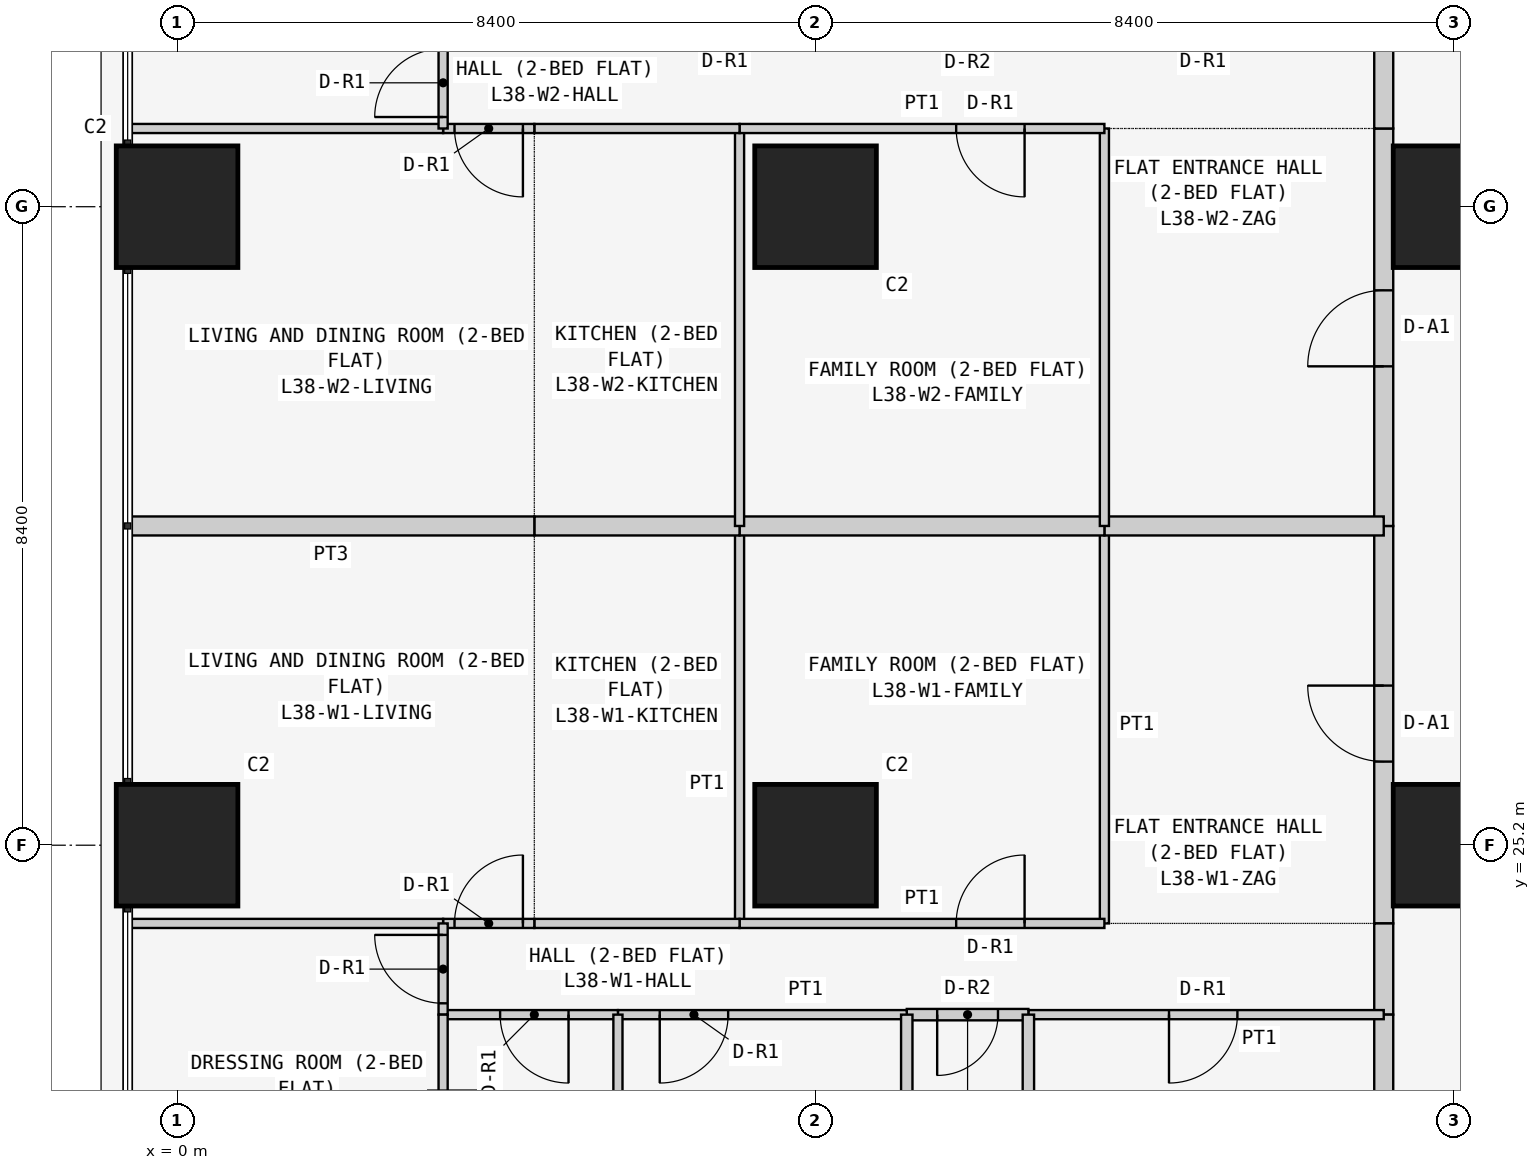
"""IFC4 building model, lengths in metres.
Left out: names, types, materials, properties, quantities, classifications, styles, units other than length and angle.
Written with IfcOpenShell. Run it as: python <this file> out.ifc"""

import sys

from ifc_helpers import new_model, si_unit, direction, frame, frame_2d, origin, origin_2d, place, context, subcontext, project, spatial, rectangle, extrude, element, fill, save


model = new_model("IFC4")
c1 = context("Model", 3, precision=1e-05, world=origin(), true_north=direction((0.0, 1.0)))
c2 = subcontext(c1, "Body", "Model", "MODEL_VIEW")
j1 = project(units=[si_unit("LENGTHUNIT", "METRE"), si_unit("PLANEANGLEUNIT", "RADIAN")], contexts=[c1])
p1 = place(None, origin())
s1 = spatial("IfcSite", under=j1, at=p1, CompositionType="ELEMENT")
p2 = place(p1, origin())
s2 = spatial("IfcBuilding", under=s1, at=p2, CompositionType="ELEMENT")
p3 = place(p2, frame((0.0, 0.0, 148.5)))
s3 = spatial("IfcBuildingStorey", under=s2, at=p3, CompositionType="ELEMENT", Elevation=148.5)
for number, where, z_axis, x_axis in (
    (1, (0.0, 25.2, 0.0), (0.0, 0.0, 1.0), (1.0, 0.0, 0.0)),
    (2, (0.0, 33.6, 0.0), (0.0, 0.0, 1.0), (1.0, 0.0, 0.0)),
    (3, (8.4, 25.2, 0.0), (0.0, 0.0, 1.0), (1.0, 0.0, 0.0)),
    (4, (8.4, 33.6, 0.0), (0.0, 0.0, 1.0), (1.0, 0.0, 0.0)),
    (5, (16.8, 25.2, 0.0), (0.0, 0.0, 1.0), (1.0, 0.0, 0.0)),
    (6, (16.8, 33.6, 0.0), (0.0, 0.0, 1.0), (1.0, 0.0, 0.0)),
):
    element("IfcColumn", number, at=place(p3, frame(where, z_axis=z_axis, x_axis=x_axis)), inside=s3, PredefinedType="COLUMN", context=c2, shape_type="SweptSolid", body=[
        extrude(rectangle(XDim=1.6, YDim=1.6, at=origin_2d()), origin(), (0.0, 0.0, 1.0), 3.6),
    ])
p4 = place(p3, frame((15.875, 24.171, 0.0), z_axis=(0.0, 0.0, 1.0), x_axis=(0.0, 1.0, 0.0)))
e7 = element("IfcWall", 7, at=p4, inside=s3, PredefinedType="PARTITIONING", context=c2, shape_type="SweptSolid", body=[
    extrude(rectangle(XDim=5.229, YDim=0.25, at=frame_2d((2.615, 0.0))), origin(), (0.0, 0.0, 1.0), 3.45),
])
p5 = place(p4, frame((2.129, 0.0, 0.0)))
e8 = element("IfcOpeningElement", 8, at=p5, cuts=e7, PredefinedType="OPENING", context=c2, shape_type="SweptSolid", body=[
    extrude(rectangle(XDim=1.0, YDim=2.1, at=frame_2d((0.5, 1.05))), frame((0.0, 0.135, 0.0), z_axis=(0.0, -1.0, 0.0), x_axis=(1.0, 0.0, 0.0)), (0.0, 0.0, 1.0), 0.27),
])
p6 = place(p3, frame((15.875, 22.971, 0.0), z_axis=(0.0, 0.0, 1.0), x_axis=(0.0, 1.0, 0.0)))
e9 = element("IfcWall", 9, at=p6, inside=s3, PredefinedType="PARTITIONING", context=c2, shape_type="SweptSolid", body=[
    extrude(rectangle(XDim=1.2, YDim=0.25, at=frame_2d((0.6, 0.0))), origin(), (0.0, 0.0, 1.0), 3.45),
])
p7 = place(p3, frame((15.875, 16.1, 0.0), z_axis=(0.0, 0.0, 1.0), x_axis=(0.0, 1.0, 0.0)))
e10 = element("IfcWall", 10, at=p7, inside=s3, PredefinedType="PARTITIONING", context=c2, shape_type="SweptSolid", body=[
    extrude(rectangle(XDim=6.871, YDim=0.25, at=frame_2d((3.436, 0.0))), origin(), (0.0, 0.0, 1.0), 3.45),
])
p8 = place(p3, frame((15.875, 29.4, 0.0), z_axis=(0.0, 0.0, 1.0), x_axis=(0.0, 1.0, 0.0)))
e11 = element("IfcWall", 11, at=p8, inside=s3, PredefinedType="PARTITIONING", context=c2, shape_type="SweptSolid", body=[
    extrude(rectangle(XDim=5.229, YDim=0.25, at=frame_2d((2.615, 0.0))), origin(), (0.0, 0.0, 1.0), 3.45),
])
p9 = place(p8, frame((2.1, 0.0, 0.0)))
e12 = element("IfcOpeningElement", 12, at=p9, cuts=e11, PredefinedType="OPENING", context=c2, shape_type="SweptSolid", body=[
    extrude(rectangle(XDim=1.0, YDim=2.1, at=frame_2d((0.5, 1.05))), frame((0.0, 0.135, 0.0), z_axis=(0.0, -1.0, 0.0), x_axis=(1.0, 0.0, 0.0)), (0.0, 0.0, 1.0), 0.27),
])
p10 = place(p3, frame((15.875, 34.629, 0.0), z_axis=(0.0, 0.0, 1.0), x_axis=(0.0, 1.0, 0.0)))
e13 = element("IfcWall", 13, at=p10, inside=s3, PredefinedType="PARTITIONING", context=c2, shape_type="SweptSolid", body=[
    extrude(rectangle(XDim=1.2, YDim=0.25, at=frame_2d((0.6, 0.0))), origin(), (0.0, 0.0, 1.0), 3.45),
])
p11 = place(p3, frame((12.2, 29.4, 0.0), z_axis=(0.0, 0.0, 1.0), x_axis=(0.0, -1.0, 0.0)))
e14 = element("IfcWall", 14, at=p11, inside=s3, PredefinedType="PARTITIONING", context=c2, shape_type="SweptSolid", body=[
    extrude(rectangle(XDim=5.229, YDim=0.12, at=frame_2d((2.615, 0.0))), origin(), (0.0, 0.0, 1.0), 3.45),
])
p12 = place(p3, frame((15.875, 29.4, 0.0), z_axis=(0.0, 0.0, 1.0), x_axis=(-1.0, 0.0, 0.0)))
e15 = element("IfcWall", 15, at=p12, inside=s3, PredefinedType="PARTITIONING", context=c2, shape_type="SweptSolid", body=[
    extrude(rectangle(XDim=3.675, YDim=0.25, at=frame_2d((1.837, 0.0))), origin(), (0.0, 0.0, 1.0), 3.45),
])
p13 = place(p3, frame((7.4, 29.4, 0.0), z_axis=(0.0, 0.0, 1.0), x_axis=(0.0, -1.0, 0.0)))
e16 = element("IfcWall", 16, at=p13, inside=s3, PredefinedType="PARTITIONING", context=c2, shape_type="SweptSolid", body=[
    extrude(rectangle(XDim=5.229, YDim=0.12, at=frame_2d((2.615, 0.0))), origin(), (0.0, 0.0, 1.0), 3.45),
])
p14 = place(p3, frame((7.4, 24.171, 0.0), z_axis=(0.0, 0.0, 1.0), x_axis=(1.0, 0.0, 0.0)))
e17 = element("IfcWall", 17, at=p14, inside=s3, PredefinedType="PARTITIONING", context=c2, shape_type="SweptSolid", body=[
    extrude(rectangle(XDim=4.8, YDim=0.12, at=frame_2d((2.4, 0.0))), origin(), (0.0, 0.0, 1.0), 3.45),
])
p15 = place(p14, frame((2.85, 0.0, 0.0)))
e18 = element("IfcOpeningElement", 18, at=p15, cuts=e17, PredefinedType="OPENING", context=c2, shape_type="SweptSolid", body=[
    extrude(rectangle(XDim=0.9, YDim=2.1, at=frame_2d((0.45, 1.05))), frame((0.0, 0.07, 0.0), z_axis=(0.0, -1.0, 0.0), x_axis=(1.0, 0.0, 0.0)), (0.0, 0.0, 1.0), 0.14),
])
p16 = place(p3, frame((12.2, 29.4, 0.0), z_axis=(0.0, 0.0, 1.0), x_axis=(-1.0, 0.0, 0.0)))
e19 = element("IfcWall", 19, at=p16, inside=s3, PredefinedType="PARTITIONING", context=c2, shape_type="SweptSolid", body=[
    extrude(rectangle(XDim=4.8, YDim=0.25, at=frame_2d((2.4, 0.0))), origin(), (0.0, 0.0, 1.0), 3.45),
])
p17 = place(p3, frame((4.7, 24.171, 0.0), z_axis=(0.0, 0.0, 1.0), x_axis=(1.0, 0.0, 0.0)))
e20 = element("IfcWall", 20, at=p17, inside=s3, PredefinedType="PARTITIONING", context=c2, shape_type="SweptSolid", body=[
    extrude(rectangle(XDim=2.7, YDim=0.12, at=frame_2d((1.35, 0.0))), origin(), (0.0, 0.0, 1.0), 3.45),
])
p18 = place(p3, frame((7.4, 29.4, 0.0), z_axis=(0.0, 0.0, 1.0), x_axis=(-1.0, 0.0, 0.0)))
e21 = element("IfcWall", 21, at=p18, inside=s3, PredefinedType="PARTITIONING", context=c2, shape_type="SweptSolid", body=[
    extrude(rectangle(XDim=2.7, YDim=0.25, at=frame_2d((1.35, 0.0))), origin(), (0.0, 0.0, 1.0), 3.45),
])
p19 = place(p3, frame((3.5, 24.171, 0.0), z_axis=(0.0, 0.0, 1.0), x_axis=(1.0, 0.0, 0.0)))
e22 = element("IfcWall", 22, at=p19, inside=s3, PredefinedType="PARTITIONING", context=c2, shape_type="SweptSolid", body=[
    extrude(rectangle(XDim=1.2, YDim=0.12, at=frame_2d((0.6, 0.0))), origin(), (0.0, 0.0, 1.0), 3.45),
])
p20 = place(p19, frame((0.15, 0.0, 0.0)))
e23 = element("IfcOpeningElement", 23, at=p20, cuts=e22, PredefinedType="OPENING", context=c2, shape_type="SweptSolid", body=[
    extrude(rectangle(XDim=0.9, YDim=2.1, at=frame_2d((0.45, 1.05))), frame((0.0, 0.07, 0.0), z_axis=(0.0, -1.0, 0.0), x_axis=(1.0, 0.0, 0.0)), (0.0, 0.0, 1.0), 0.14),
])
p21 = place(p3, frame((-0.65, 24.171, 0.0), z_axis=(0.0, 0.0, 1.0), x_axis=(1.0, 0.0, 0.0)))
e24 = element("IfcWall", 24, at=p21, inside=s3, PredefinedType="PARTITIONING", context=c2, shape_type="SweptSolid", body=[
    extrude(rectangle(XDim=4.15, YDim=0.12, at=frame_2d((2.075, 0.0))), origin(), (0.0, 0.0, 1.0), 3.45),
])
p22 = place(p3, frame((4.7, 29.4, 0.0), z_axis=(0.0, 0.0, 1.0), x_axis=(-1.0, 0.0, 0.0)))
e25 = element("IfcWall", 25, at=p22, inside=s3, PredefinedType="PARTITIONING", context=c2, shape_type="SweptSolid", body=[
    extrude(rectangle(XDim=5.35, YDim=0.25, at=frame_2d((2.675, 0.0))), origin(), (0.0, 0.0, 1.0), 3.45),
])
p23 = place(p3, frame((11.2, 22.971, 0.0), z_axis=(0.0, 0.0, 1.0), x_axis=(1.0, 0.0, 0.0)))
e26 = element("IfcWall", 26, at=p23, inside=s3, PredefinedType="PARTITIONING", context=c2, shape_type="SweptSolid", body=[
    extrude(rectangle(XDim=4.675, YDim=0.12, at=frame_2d((2.337, 0.0))), origin(), (0.0, 0.0, 1.0), 3.45),
])
p24 = place(p23, frame((1.85, 0.0, 0.0)))
e27 = element("IfcOpeningElement", 27, at=p24, cuts=e26, PredefinedType="OPENING", context=c2, shape_type="SweptSolid", body=[
    extrude(rectangle(XDim=0.9, YDim=2.1, at=frame_2d((0.45, 1.05))), frame((0.0, 0.07, 0.0), z_axis=(0.0, -1.0, 0.0), x_axis=(1.0, 0.0, 0.0)), (0.0, 0.0, 1.0), 0.14),
])
p25 = place(p3, frame((9.6, 22.971, 0.0), z_axis=(0.0, 0.0, 1.0), x_axis=(1.0, 0.0, 0.0)))
e28 = element("IfcWall", 28, at=p25, inside=s3, PredefinedType="PARTITIONING", context=c2, shape_type="SweptSolid", body=[
    extrude(rectangle(XDim=1.6, YDim=0.15, at=frame_2d((0.8, 0.0))), origin(), (0.0, 0.0, 1.0), 3.45),
])
p26 = place(p25, frame((0.4, 0.0, 0.0)))
e29 = element("IfcOpeningElement", 29, at=p26, cuts=e28, PredefinedType="OPENING", context=c2, shape_type="SweptSolid", body=[
    extrude(rectangle(XDim=0.8, YDim=2.1, at=frame_2d((0.4, 1.05))), frame((0.0, 0.085, 0.0), z_axis=(0.0, -1.0, 0.0), x_axis=(1.0, 0.0, 0.0)), (0.0, 0.0, 1.0), 0.17),
])
p27 = place(p3, frame((5.8, 22.971, 0.0), z_axis=(0.0, 0.0, 1.0), x_axis=(1.0, 0.0, 0.0)))
e30 = element("IfcWall", 30, at=p27, inside=s3, PredefinedType="PARTITIONING", context=c2, shape_type="SweptSolid", body=[
    extrude(rectangle(XDim=3.8, YDim=0.12, at=frame_2d((1.9, 0.0))), origin(), (0.0, 0.0, 1.0), 3.45),
])
p28 = place(p27, frame((0.55, 0.0, 0.0)))
e31 = element("IfcOpeningElement", 31, at=p28, cuts=e30, PredefinedType="OPENING", context=c2, shape_type="SweptSolid", body=[
    extrude(rectangle(XDim=0.9, YDim=2.1, at=frame_2d((0.45, 1.05))), frame((0.0, 0.07, 0.0), z_axis=(0.0, -1.0, 0.0), x_axis=(1.0, 0.0, 0.0)), (0.0, 0.0, 1.0), 0.14),
])
p29 = place(p3, frame((3.5, 22.971, 0.0), z_axis=(0.0, 0.0, 1.0), x_axis=(1.0, 0.0, 0.0)))
e32 = element("IfcWall", 32, at=p29, inside=s3, PredefinedType="PARTITIONING", context=c2, shape_type="SweptSolid", body=[
    extrude(rectangle(XDim=2.3, YDim=0.12, at=frame_2d((1.15, 0.0))), origin(), (0.0, 0.0, 1.0), 3.45),
])
p30 = place(p29, frame((0.75, 0.0, 0.0)))
e33 = element("IfcOpeningElement", 33, at=p30, cuts=e32, PredefinedType="OPENING", context=c2, shape_type="SweptSolid", body=[
    extrude(rectangle(XDim=0.9, YDim=2.1, at=frame_2d((0.45, 1.05))), frame((0.0, 0.07, 0.0), z_axis=(0.0, -1.0, 0.0), x_axis=(1.0, 0.0, 0.0)), (0.0, 0.0, 1.0), 0.14),
])
p31 = place(p3, frame((3.5, 24.171, 0.0), z_axis=(0.0, 0.0, 1.0), x_axis=(0.0, -1.0, 0.0)))
e34 = element("IfcWall", 34, at=p31, inside=s3, PredefinedType="PARTITIONING", context=c2, shape_type="SweptSolid", body=[
    extrude(rectangle(XDim=1.2, YDim=0.12, at=frame_2d((0.6, 0.0))), origin(), (0.0, 0.0, 1.0), 3.45),
])
p32 = place(p31, frame((0.151, 0.0, 0.0)))
e35 = element("IfcOpeningElement", 35, at=p32, cuts=e34, PredefinedType="OPENING", context=c2, shape_type="SweptSolid", body=[
    extrude(rectangle(XDim=0.9, YDim=2.1, at=frame_2d((0.45, 1.05))), frame((0.0, 0.07, 0.0), z_axis=(0.0, -1.0, 0.0), x_axis=(1.0, 0.0, 0.0)), (0.0, 0.0, 1.0), 0.14),
])
for number, where, z_axis, x_axis in (
    (36, (11.2, 22.971, 0.0), (0.0, 0.0, 1.0), (0.0, -1.0, 0.0)),
    (37, (9.6, 22.971, 0.0), (0.0, 0.0, 1.0), (0.0, -1.0, 0.0)),
):
    element("IfcWall", number, at=place(p3, frame(where, z_axis=z_axis, x_axis=x_axis)), inside=s3, PredefinedType="PARTITIONING", context=c2, shape_type="SweptSolid", body=[
        extrude(rectangle(XDim=6.871, YDim=0.15, at=frame_2d((3.436, 0.0))), origin(), (0.0, 0.0, 1.0), 3.45),
    ])
for number, where, z_axis, x_axis in (
    (38, (5.8, 20.971, 0.0), (0.0, 0.0, 1.0), (0.0, 1.0, 0.0)),
    (39, (3.5, 22.971, 0.0), (0.0, 0.0, 1.0), (0.0, -1.0, 0.0)),
):
    element("IfcWall", number, at=place(p3, frame(where, z_axis=z_axis, x_axis=x_axis)), inside=s3, PredefinedType="PARTITIONING", context=c2, shape_type="SweptSolid", body=[
        extrude(rectangle(XDim=2.0, YDim=0.12, at=frame_2d((1.0, 0.0))), origin(), (0.0, 0.0, 1.0), 3.45),
    ])
for number, where, z_axis, x_axis in (
    (40, (12.2, 29.4, 0.0), (0.0, 0.0, 1.0), (0.0, 1.0, 0.0)),
    (41, (7.4, 29.4, 0.0), (0.0, 0.0, 1.0), (0.0, 1.0, 0.0)),
):
    element("IfcWall", number, at=place(p3, frame(where, z_axis=z_axis, x_axis=x_axis)), inside=s3, PredefinedType="PARTITIONING", context=c2, shape_type="SweptSolid", body=[
        extrude(rectangle(XDim=5.229, YDim=0.12, at=frame_2d((2.615, 0.0))), origin(), (0.0, 0.0, 1.0), 3.45),
    ])
p33 = place(p3, frame((7.4, 34.629, 0.0), z_axis=(0.0, 0.0, 1.0), x_axis=(1.0, 0.0, 0.0)))
e42 = element("IfcWall", 42, at=p33, inside=s3, PredefinedType="PARTITIONING", context=c2, shape_type="SweptSolid", body=[
    extrude(rectangle(XDim=4.8, YDim=0.12, at=frame_2d((2.4, 0.0))), origin(), (0.0, 0.0, 1.0), 3.45),
])
p34 = place(p33, frame((2.85, 0.0, 0.0)))
e43 = element("IfcOpeningElement", 43, at=p34, cuts=e42, PredefinedType="OPENING", context=c2, shape_type="SweptSolid", body=[
    extrude(rectangle(XDim=0.9, YDim=2.1, at=frame_2d((0.45, 1.05))), frame((0.0, 0.07, 0.0), z_axis=(0.0, -1.0, 0.0), x_axis=(1.0, 0.0, 0.0)), (0.0, 0.0, 1.0), 0.14),
])
p35 = place(p3, frame((4.7, 34.629, 0.0), z_axis=(0.0, 0.0, 1.0), x_axis=(1.0, 0.0, 0.0)))
e44 = element("IfcWall", 44, at=p35, inside=s3, PredefinedType="PARTITIONING", context=c2, shape_type="SweptSolid", body=[
    extrude(rectangle(XDim=2.7, YDim=0.12, at=frame_2d((1.35, 0.0))), origin(), (0.0, 0.0, 1.0), 3.45),
])
p36 = place(p3, frame((3.5, 34.629, 0.0), z_axis=(0.0, 0.0, 1.0), x_axis=(1.0, 0.0, 0.0)))
e45 = element("IfcWall", 45, at=p36, inside=s3, PredefinedType="PARTITIONING", context=c2, shape_type="SweptSolid", body=[
    extrude(rectangle(XDim=1.2, YDim=0.12, at=frame_2d((0.6, 0.0))), origin(), (0.0, 0.0, 1.0), 3.45),
])
p37 = place(p36, frame((0.15, 0.0, 0.0)))
e46 = element("IfcOpeningElement", 46, at=p37, cuts=e45, PredefinedType="OPENING", context=c2, shape_type="SweptSolid", body=[
    extrude(rectangle(XDim=0.9, YDim=2.1, at=frame_2d((0.45, 1.05))), frame((0.0, 0.07, 0.0), z_axis=(0.0, -1.0, 0.0), x_axis=(1.0, 0.0, 0.0)), (0.0, 0.0, 1.0), 0.14),
])
p38 = place(p3, frame((-0.65, 34.629, 0.0), z_axis=(0.0, 0.0, 1.0), x_axis=(1.0, 0.0, 0.0)))
e47 = element("IfcWall", 47, at=p38, inside=s3, PredefinedType="PARTITIONING", context=c2, shape_type="SweptSolid", body=[
    extrude(rectangle(XDim=4.15, YDim=0.12, at=frame_2d((2.075, 0.0))), origin(), (0.0, 0.0, 1.0), 3.45),
])
p39 = place(p3, frame((3.5, 34.629, 0.0), z_axis=(0.0, 0.0, 1.0), x_axis=(0.0, 1.0, 0.0)))
e48 = element("IfcWall", 48, at=p39, inside=s3, PredefinedType="PARTITIONING", context=c2, shape_type="SweptSolid", body=[
    extrude(rectangle(XDim=1.2, YDim=0.12, at=frame_2d((0.6, 0.0))), origin(), (0.0, 0.0, 1.0), 3.45),
])
p40 = place(p39, frame((0.151, 0.0, 0.0)))
e49 = element("IfcOpeningElement", 49, at=p40, cuts=e48, PredefinedType="OPENING", context=c2, shape_type="SweptSolid", body=[
    extrude(rectangle(XDim=0.9, YDim=2.1, at=frame_2d((0.45, 1.05))), frame((0.0, 0.07, 0.0), z_axis=(0.0, -1.0, 0.0), x_axis=(1.0, 0.0, 0.0)), (0.0, 0.0, 1.0), 0.14),
])
p41 = place(p5, origin())
e50 = element("IfcDoor", 50, at=p41, inside=s3, OperationType="SINGLE_SWING_RIGHT", PredefinedType="DOOR", context=c2, shape_type="SweptSolid", body=[
    extrude(rectangle(XDim=1.0, YDim=2.1, at=frame_2d((0.5, 1.05))), frame((0.0, 0.025, 0.0), z_axis=(0.0, -1.0, 0.0), x_axis=(1.0, 0.0, 0.0)), (0.0, 0.0, 1.0), 0.05),
])
fill(e8, e50)
p42 = place(p15, origin())
e51 = element("IfcDoor", 51, at=p42, inside=s3, OperationType="SINGLE_SWING_RIGHT", PredefinedType="DOOR", context=c2, shape_type="SweptSolid", body=[
    extrude(rectangle(XDim=0.9, YDim=2.1, at=frame_2d((0.45, 1.05))), frame((0.0, 0.025, 0.0), z_axis=(0.0, -1.0, 0.0), x_axis=(1.0, 0.0, 0.0)), (0.0, 0.0, 1.0), 0.05),
])
fill(e18, e51)
p43 = place(p20, origin())
e52 = element("IfcDoor", 52, at=p43, inside=s3, OperationType="SINGLE_SWING_RIGHT", PredefinedType="DOOR", context=c2, shape_type="SweptSolid", body=[
    extrude(rectangle(XDim=0.9, YDim=2.1, at=frame_2d((0.45, 1.05))), frame((0.0, 0.025, 0.0), z_axis=(0.0, -1.0, 0.0), x_axis=(1.0, 0.0, 0.0)), (0.0, 0.0, 1.0), 0.05),
])
fill(e23, e52)
p44 = place(p24, frame((0.9, 0.0, 0.0), z_axis=(0.0, 0.0, 1.0), x_axis=(-1.0, 0.0, 0.0)))
e53 = element("IfcDoor", 53, at=p44, inside=s3, OperationType="SINGLE_SWING_RIGHT", PredefinedType="DOOR", context=c2, shape_type="SweptSolid", body=[
    extrude(rectangle(XDim=0.9, YDim=2.1, at=frame_2d((0.45, 1.05))), frame((0.0, 0.025, 0.0), z_axis=(0.0, -1.0, 0.0), x_axis=(1.0, 0.0, 0.0)), (0.0, 0.0, 1.0), 0.05),
])
fill(e27, e53)
p45 = place(p26, frame((0.8, 0.0, 0.0), z_axis=(0.0, 0.0, 1.0), x_axis=(-1.0, 0.0, 0.0)))
e54 = element("IfcDoor", 54, at=p45, inside=s3, OperationType="SINGLE_SWING_RIGHT", PredefinedType="DOOR", context=c2, shape_type="SweptSolid", body=[
    extrude(rectangle(XDim=0.8, YDim=2.1, at=frame_2d((0.4, 1.05))), frame((0.0, 0.025, 0.0), z_axis=(0.0, -1.0, 0.0), x_axis=(1.0, 0.0, 0.0)), (0.0, 0.0, 1.0), 0.05),
])
fill(e29, e54)
p46 = place(p28, frame((0.9, 0.0, 0.0), z_axis=(0.0, 0.0, 1.0), x_axis=(-1.0, 0.0, 0.0)))
e55 = element("IfcDoor", 55, at=p46, inside=s3, OperationType="SINGLE_SWING_RIGHT", PredefinedType="DOOR", context=c2, shape_type="SweptSolid", body=[
    extrude(rectangle(XDim=0.9, YDim=2.1, at=frame_2d((0.45, 1.05))), frame((0.0, 0.025, 0.0), z_axis=(0.0, -1.0, 0.0), x_axis=(1.0, 0.0, 0.0)), (0.0, 0.0, 1.0), 0.05),
])
fill(e31, e55)
p47 = place(p30, frame((0.9, 0.0, 0.0), z_axis=(0.0, 0.0, 1.0), x_axis=(-1.0, 0.0, 0.0)))
e56 = element("IfcDoor", 56, at=p47, inside=s3, OperationType="SINGLE_SWING_LEFT", PredefinedType="DOOR", context=c2, shape_type="SweptSolid", body=[
    extrude(rectangle(XDim=0.9, YDim=2.1, at=frame_2d((0.45, 1.05))), frame((0.0, 0.025, 0.0), z_axis=(0.0, -1.0, 0.0), x_axis=(1.0, 0.0, 0.0)), (0.0, 0.0, 1.0), 0.05),
])
fill(e33, e56)
p48 = place(p32, frame((0.9, 0.0, 0.0), z_axis=(0.0, 0.0, 1.0), x_axis=(-1.0, 0.0, 0.0)))
e57 = element("IfcDoor", 57, at=p48, inside=s3, OperationType="SINGLE_SWING_RIGHT", PredefinedType="DOOR", context=c2, shape_type="SweptSolid", body=[
    extrude(rectangle(XDim=0.9, YDim=2.1, at=frame_2d((0.45, 1.05))), frame((0.0, 0.025, 0.0), z_axis=(0.0, -1.0, 0.0), x_axis=(1.0, 0.0, 0.0)), (0.0, 0.0, 1.0), 0.05),
])
fill(e35, e57)
p49 = place(p9, origin())
e58 = element("IfcDoor", 58, at=p49, inside=s3, OperationType="SINGLE_SWING_LEFT", PredefinedType="DOOR", context=c2, shape_type="SweptSolid", body=[
    extrude(rectangle(XDim=1.0, YDim=2.1, at=frame_2d((0.5, 1.05))), frame((0.0, 0.025, 0.0), z_axis=(0.0, -1.0, 0.0), x_axis=(1.0, 0.0, 0.0)), (0.0, 0.0, 1.0), 0.05),
])
fill(e12, e58)
p50 = place(p34, frame((0.9, 0.0, 0.0), z_axis=(0.0, 0.0, 1.0), x_axis=(-1.0, 0.0, 0.0)))
e59 = element("IfcDoor", 59, at=p50, inside=s3, OperationType="SINGLE_SWING_LEFT", PredefinedType="DOOR", context=c2, shape_type="SweptSolid", body=[
    extrude(rectangle(XDim=0.9, YDim=2.1, at=frame_2d((0.45, 1.05))), frame((0.0, 0.025, 0.0), z_axis=(0.0, -1.0, 0.0), x_axis=(1.0, 0.0, 0.0)), (0.0, 0.0, 1.0), 0.05),
])
fill(e43, e59)
p51 = place(p37, frame((0.9, 0.0, 0.0), z_axis=(0.0, 0.0, 1.0), x_axis=(-1.0, 0.0, 0.0)))
e60 = element("IfcDoor", 60, at=p51, inside=s3, OperationType="SINGLE_SWING_LEFT", PredefinedType="DOOR", context=c2, shape_type="SweptSolid", body=[
    extrude(rectangle(XDim=0.9, YDim=2.1, at=frame_2d((0.45, 1.05))), frame((0.0, 0.025, 0.0), z_axis=(0.0, -1.0, 0.0), x_axis=(1.0, 0.0, 0.0)), (0.0, 0.0, 1.0), 0.05),
])
fill(e46, e60)
p52 = place(p40, origin())
e61 = element("IfcDoor", 61, at=p52, inside=s3, OperationType="SINGLE_SWING_LEFT", PredefinedType="DOOR", context=c2, shape_type="SweptSolid", body=[
    extrude(rectangle(XDim=0.9, YDim=2.1, at=frame_2d((0.45, 1.05))), frame((0.0, 0.025, 0.0), z_axis=(0.0, -1.0, 0.0), x_axis=(1.0, 0.0, 0.0)), (0.0, 0.0, 1.0), 0.05),
])
fill(e49, e61)
save(model, sys.argv[1])
